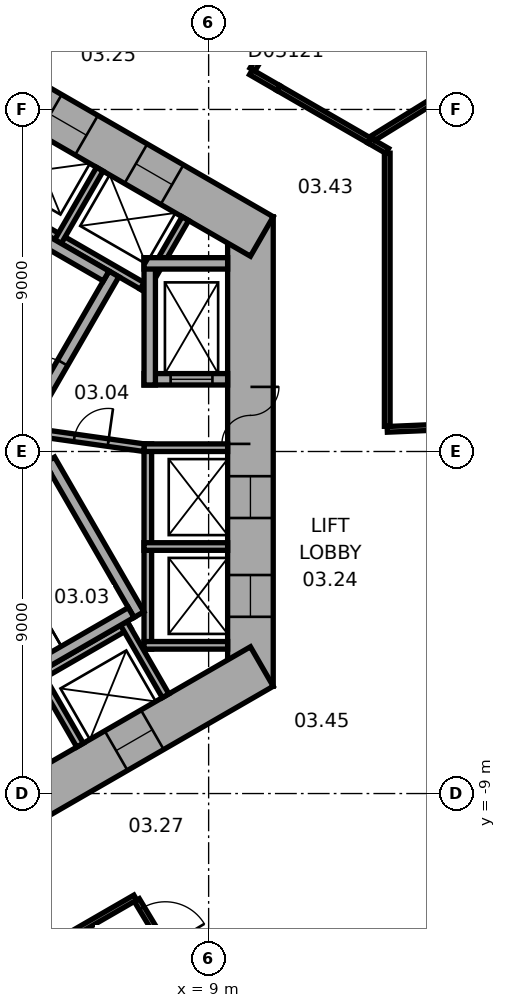
"""IFC4 building model, lengths in metres.
Left out: names, types, materials, properties, quantities, classifications, styles, units other than length and angle.
Written with IfcOpenShell. Run it as: python <this file> out.ifc"""

import sys

from ifc_helpers import new_model, si_unit, direction, frame, frame_2d, origin, place, context, subcontext, project, spatial, rectangle, extrude, element, fill, save


model = new_model("IFC4")
c1 = context("Model", 3, precision=1e-05, world=origin(), true_north=direction((0.0, 1.0)))
c2 = subcontext(c1, "Body", "Model", "MODEL_VIEW")
j1 = project(units=[si_unit("LENGTHUNIT", "METRE"), si_unit("PLANEANGLEUNIT", "RADIAN")], contexts=[c1])
p1 = place(None, origin())
s1 = spatial("IfcSite", under=j1, at=p1, CompositionType="ELEMENT")
p2 = place(p1, origin())
s2 = spatial("IfcBuilding", under=s1, at=p2, CompositionType="ELEMENT")
p3 = place(p2, frame((0.0, 0.0, 21.0)))
s3 = spatial("IfcBuildingStorey", under=s2, at=p3, CompositionType="ELEMENT", Elevation=21.0)
p4 = place(p3, frame((10.1, -6.177, 0.0), z_axis=(0.0, 0.0, 1.0), x_axis=(0.0, 1.0, 0.0)))
e1 = element("IfcWall", 1, at=p4, inside=s3, PredefinedType="SHEAR", context=c2, shape_type="SweptSolid", body=[
    extrude(rectangle(XDim=12.355, YDim=1.2, at=frame_2d((6.177, 0.0))), origin(), (0.0, 0.0, 1.0), 8.0),
])
p5 = place(p4, frame((6.378, 0.0, 0.0)))
e2 = element("IfcOpeningElement", 2, at=p5, cuts=e1, PredefinedType="OPENING", context=c2, shape_type="SweptSolid", body=[
    extrude(rectangle(XDim=1.5, YDim=2.1, at=frame_2d((0.75, 1.05))), frame((0.0, 0.61, 0.0), z_axis=(0.0, -1.0, 0.0), x_axis=(1.0, 0.0, 0.0)), (0.0, 0.0, 1.0), 1.22),
])
p6 = place(p4, frame((1.828, 0.0, 0.0)))
e3 = element("IfcOpeningElement", 3, at=p6, cuts=e1, PredefinedType="OPENING", context=c2, shape_type="SweptSolid", body=[
    extrude(rectangle(XDim=1.1, YDim=2.1, at=frame_2d((0.55, 1.05))), frame((0.0, 0.61, 0.0), z_axis=(0.0, -1.0, 0.0), x_axis=(1.0, 0.0, 0.0)), (0.0, 0.0, 1.0), 1.22),
])
p7 = place(p4, frame((4.427, 0.0, 0.0)))
e4 = element("IfcOpeningElement", 4, at=p7, cuts=e1, PredefinedType="OPENING", context=c2, shape_type="SweptSolid", body=[
    extrude(rectangle(XDim=1.1, YDim=2.1, at=frame_2d((0.55, 1.05))), frame((0.0, 0.61, 0.0), z_axis=(0.0, -1.0, 0.0), x_axis=(1.0, 0.0, 0.0)), (0.0, 0.0, 1.0), 1.22),
])
p8 = place(p3, frame((10.4, 5.658, 0.0), z_axis=(0.0, 0.0, 1.0), x_axis=(-0.866021384402, 0.500006961711, 0.0)))
e5 = element("IfcWall", 5, at=p8, inside=s3, PredefinedType="SHEAR", context=c2, shape_type="SweptSolid", body=[
    extrude(rectangle(XDim=12.355, YDim=1.2, at=frame_2d((6.178, 0.0))), origin(), (0.0, 0.0, 1.0), 8.0),
])
p9 = place(p8, frame((2.728, 0.0, 0.0)))
e6 = element("IfcOpeningElement", 6, at=p9, cuts=e5, PredefinedType="OPENING", context=c2, shape_type="SweptSolid", body=[
    extrude(rectangle(XDim=1.1, YDim=2.1, at=frame_2d((0.55, 1.05))), frame((0.0, 0.61, 0.0), z_axis=(0.0, -1.0, 0.0), x_axis=(1.0, 0.0, 0.0)), (0.0, 0.0, 1.0), 1.22),
])
p10 = place(p8, frame((5.328, 0.0, 0.0)))
e7 = element("IfcOpeningElement", 7, at=p10, cuts=e5, PredefinedType="OPENING", context=c2, shape_type="SweptSolid", body=[
    extrude(rectangle(XDim=1.1, YDim=2.1, at=frame_2d((0.55, 1.05))), frame((0.0, 0.61, 0.0), z_axis=(0.0, -1.0, 0.0), x_axis=(1.0, 0.0, 0.0)), (0.0, 0.0, 1.0), 1.22),
])
p11 = place(p8, frame((7.928, 0.0, 0.0)))
e8 = element("IfcOpeningElement", 8, at=p11, cuts=e5, PredefinedType="OPENING", context=c2, shape_type="SweptSolid", body=[
    extrude(rectangle(XDim=1.1, YDim=2.1, at=frame_2d((0.55, 1.05))), frame((0.0, 0.61, 0.0), z_axis=(0.0, -1.0, 0.0), x_axis=(1.0, 0.0, 0.0)), (0.0, 0.0, 1.0), 1.22),
])
p12 = place(p3, frame((-0.3, -11.836, 0.0), z_axis=(0.0, 0.0, 1.0), x_axis=(0.866021384402, 0.500006961711, 0.0)))
e9 = element("IfcWall", 9, at=p12, inside=s3, PredefinedType="SHEAR", context=c2, shape_type="SweptSolid", body=[
    extrude(rectangle(XDim=12.355, YDim=1.2, at=frame_2d((6.178, 0.0))), origin(), (0.0, 0.0, 1.0), 8.0),
])
p13 = place(p12, frame((4.128, 0.0, 0.0)))
e10 = element("IfcOpeningElement", 10, at=p13, cuts=e9, PredefinedType="OPENING", context=c2, shape_type="SweptSolid", body=[
    extrude(rectangle(XDim=0.9, YDim=2.1, at=frame_2d((0.45, 1.05))), frame((0.0, 0.61, 0.0), z_axis=(0.0, -1.0, 0.0), x_axis=(1.0, 0.0, 0.0)), (0.0, 0.0, 1.0), 1.22),
])
p14 = place(p12, frame((7.928, 0.0, 0.0)))
e11 = element("IfcOpeningElement", 11, at=p14, cuts=e9, PredefinedType="OPENING", context=c2, shape_type="SweptSolid", body=[
    extrude(rectangle(XDim=1.1, YDim=2.1, at=frame_2d((0.55, 1.05))), frame((0.0, 0.61, 0.0), z_axis=(0.0, -1.0, 0.0), x_axis=(1.0, 0.0, 0.0)), (0.0, 0.0, 1.0), 1.22),
])
p15 = place(p3, frame((7.4, -5.2, 0.0), z_axis=(0.0, 0.0, 1.0), x_axis=(0.0, 1.0, 0.0)))
e12 = element("IfcWall", 12, at=p15, inside=s3, PredefinedType="PARTITIONING", context=c2, shape_type="SweptSolid", body=[
    extrude(rectangle(XDim=5.4, YDim=0.2, at=frame_2d((2.7, 0.0))), origin(), (0.0, 0.0, 1.0), 7.7),
])
for number, where, z_axis, x_axis in (
    (13, (7.3, -5.1, 0.0), (0.0, 0.0, 1.0), (1.0, 0.0, 0.0)),
    (14, (7.3, -2.5, 0.0), (0.0, 0.0, 1.0), (1.0, 0.0, 0.0)),
    (15, (7.3, 0.1, 0.0), (0.0, 0.0, 1.0), (1.0, 0.0, 0.0)),
):
    element("IfcWall", number, at=place(p3, frame(where, z_axis=z_axis, x_axis=x_axis)), inside=s3, PredefinedType="PARTITIONING", context=c2, shape_type="SweptSolid", body=[
        extrude(rectangle(XDim=2.2, YDim=0.2, at=frame_2d((1.1, 0.0))), origin(), (0.0, 0.0, 1.0), 7.7),
    ])
p16 = place(p3, frame((7.424, 4.259, 0.0), z_axis=(0.0, 0.0, 1.0), x_axis=(-0.866026010844, 0.49999894854, 0.0)))
e16 = element("IfcWall", 16, at=p16, inside=s3, PredefinedType="PARTITIONING", context=c2, shape_type="SweptSolid", body=[
    extrude(rectangle(XDim=8.0, YDim=0.2, at=frame_2d((4.0, 0.0))), origin(), (0.0, 0.0, 1.0), 7.7),
])
for number, where, z_axis, x_axis in (
    (17, (7.287, 4.222, 0.0), (0.0, 0.0, 1.0), (0.5, 0.866, 0.0)),
    (18, (5.036, 5.522, 0.0), (0.0, 0.0, 1.0), (0.5, 0.866, 0.0)),
):
    element("IfcWall", number, at=place(p3, frame(where, z_axis=z_axis, x_axis=x_axis)), inside=s3, PredefinedType="PARTITIONING", context=c2, shape_type="SweptSolid", body=[
        extrude(rectangle(XDim=2.2, YDim=0.2, at=frame_2d((1.1, 0.0))), origin(), (0.0, 0.0, 1.0), 7.7),
    ])
p17 = place(p3, frame((-0.024, -8.559, 0.0), z_axis=(0.0, 0.0, 1.0), x_axis=(0.866026010844, 0.49999894854, 0.0)))
e19 = element("IfcWall", 19, at=p17, inside=s3, PredefinedType="PARTITIONING", context=c2, shape_type="SweptSolid", body=[
    extrude(rectangle(XDim=8.0, YDim=0.2, at=frame_2d((4.0, 0.0))), origin(), (0.0, 0.0, 1.0), 7.7),
])
for number, where, z_axis, x_axis in (
    (20, (4.516, -5.822, 0.0), (0.0, 0.0, 1.0), (0.5, -0.866, 0.0)),
    (21, (6.768, -4.522, 0.0), (0.0, 0.0, 1.0), (0.5, -0.866, 0.0)),
):
    element("IfcWall", number, at=place(p3, frame(where, z_axis=z_axis, x_axis=x_axis)), inside=s3, PredefinedType="PARTITIONING", context=c2, shape_type="SweptSolid", body=[
        extrude(rectangle(XDim=2.2, YDim=0.2, at=frame_2d((1.1, 0.0))), origin(), (0.0, 0.0, 1.0), 7.7),
    ])
p18 = place(p3, frame((4.158, 0.602, 0.0), z_axis=(0.0, 0.0, 1.0), x_axis=(0.499977259774, 0.866038532462, 0.0)))
e22 = element("IfcWall", 22, at=p18, inside=s3, PredefinedType="SHEAR", context=c2, shape_type="SweptSolid", body=[
    extrude(rectangle(XDim=4.7, YDim=0.3, at=frame_2d((2.35, 0.0))), origin(), (0.0, 0.0, 1.0), 7.7),
])
p19 = place(p18, frame((0.8, 0.0, 0.0)))
e23 = element("IfcOpeningElement", 23, at=p19, cuts=e22, PredefinedType="OPENING", context=c2, shape_type="SweptSolid", body=[
    extrude(rectangle(XDim=1.2, YDim=2.1, at=frame_2d((0.6, 1.05))), frame((0.0, 0.16, 0.0), z_axis=(0.0, -1.0, 0.0), x_axis=(1.0, 0.0, 0.0)), (0.0, 0.0, 1.0), 0.32),
])
p20 = place(p3, frame((6.303, 4.617, 0.0), z_axis=(0.0, 0.0, 1.0), x_axis=(-0.866027801685, 0.499995846692, 0.0)))
e24 = element("IfcWall", 24, at=p20, inside=s3, PredefinedType="SHEAR", context=c2, shape_type="SweptSolid", body=[
    extrude(rectangle(XDim=7.06, YDim=0.3, at=frame_2d((3.53, 0.0))), origin(), (0.0, 0.0, 1.0), 7.7),
])
p21 = place(p3, frame((4.816, -0.222, 0.0), z_axis=(0.0, 0.0, 1.0), x_axis=(0.499977259774, -0.866038532462, 0.0)))
e25 = element("IfcWall", 25, at=p21, inside=s3, PredefinedType="SHEAR", context=c2, shape_type="SweptSolid", body=[
    extrude(rectangle(XDim=4.7, YDim=0.3, at=frame_2d((2.35, 0.0))), origin(), (0.0, 0.0, 1.0), 7.7),
])
p22 = place(p3, frame((0.847, -7.767, 0.0), z_axis=(0.0, 0.0, 1.0), x_axis=(0.866027801685, 0.499995846692, 0.0)))
e26 = element("IfcWall", 26, at=p22, inside=s3, PredefinedType="SHEAR", context=c2, shape_type="SweptSolid", body=[
    extrude(rectangle(XDim=7.06, YDim=0.3, at=frame_2d((3.53, 0.0))), origin(), (0.0, 0.0, 1.0), 7.7),
])
p23 = place(p3, frame((7.3, 1.9, 0.0), z_axis=(0.0, 0.0, 1.0), x_axis=(1.0, 0.0, 0.0)))
e27 = element("IfcWall", 27, at=p23, inside=s3, PredefinedType="SHEAR", context=c2, shape_type="SweptSolid", body=[
    extrude(rectangle(XDim=2.2, YDim=0.3, at=frame_2d((1.1, 0.0))), origin(), (0.0, 0.0, 1.0), 7.7),
])
p24 = place(p23, frame((0.7, 0.0, 0.0)))
e28 = element("IfcOpeningElement", 28, at=p24, cuts=e27, PredefinedType="OPENING", context=c2, shape_type="SweptSolid", body=[
    extrude(rectangle(XDim=1.1, YDim=2.1, at=frame_2d((0.55, 1.05))), frame((0.0, 0.16, 0.0), z_axis=(0.0, -1.0, 0.0), x_axis=(1.0, 0.0, 0.0)), (0.0, 0.0, 1.0), 0.32),
])
p25 = place(p3, frame((7.45, 1.75, 0.0), z_axis=(0.0, 0.0, 1.0), x_axis=(0.0, 1.0, 0.0)))
e29 = element("IfcWall", 29, at=p25, inside=s3, PredefinedType="SHEAR", context=c2, shape_type="SweptSolid", body=[
    extrude(rectangle(XDim=3.35, YDim=0.3, at=frame_2d((1.675, 0.0))), origin(), (0.0, 0.0, 1.0), 7.7),
])
p26 = place(p3, frame((7.3, 4.95, 0.0), z_axis=(0.0, 0.0, 1.0), x_axis=(1.0, 0.0, 0.0)))
e30 = element("IfcWall", 30, at=p26, inside=s3, PredefinedType="SHEAR", context=c2, shape_type="SweptSolid", body=[
    extrude(rectangle(XDim=2.2, YDim=0.3, at=frame_2d((1.1, 0.0))), origin(), (0.0, 0.0, 1.0), 7.7),
])
p27 = place(p3, frame((4.327, 0.521, 0.0), z_axis=(0.0, 0.0, 1.0), x_axis=(0.990124376366, -0.14019172346, 0.0)))
e31 = element("IfcWall", 31, at=p27, inside=s3, PredefinedType="PARTITIONING", context=c2, shape_type="SweptSolid", body=[
    extrude(rectangle(XDim=3.002, YDim=0.2, at=frame_2d((1.501, 0.0))), origin(), (0.0, 0.0, 1.0), 7.7),
])
p28 = place(p27, frame((1.15, 0.0, 0.0)))
e32 = element("IfcOpeningElement", 32, at=p28, cuts=e31, PredefinedType="OPENING", context=c2, shape_type="SweptSolid", body=[
    extrude(rectangle(XDim=0.9, YDim=2.1, at=frame_2d((0.45, 1.05))), frame((0.0, 0.11, 0.0), z_axis=(0.0, -1.0, 0.0), x_axis=(1.0, 0.0, 0.0)), (0.0, 0.0, 1.0), 0.22),
])
p29 = place(p3, frame((10.924, -18.133, 0.0), z_axis=(0.0, 0.0, 1.0), x_axis=(-0.516035715917, 0.856567066784, 0.0)))
e33 = element("IfcWall", 33, at=p29, inside=s3, PredefinedType="PARTITIONING", context=c2, shape_type="SweptSolid", body=[
    extrude(rectangle(XDim=7.387, YDim=0.15, at=frame_2d((3.693, 0.0))), origin(), (0.0, 0.0, 1.0), 7.7),
])
p30 = place(p29, frame((5.937, 0.0, 0.0)))
e34 = element("IfcOpeningElement", 34, at=p30, cuts=e33, PredefinedType="OPENING", context=c2, shape_type="SweptSolid", body=[
    extrude(rectangle(XDim=1.2, YDim=2.1, at=frame_2d((0.6, 1.05))), frame((0.0, 0.085, 0.0), z_axis=(0.0, -1.0, 0.0), x_axis=(1.0, 0.0, 0.0)), (0.0, 0.0, 1.0), 0.17),
])
p31 = place(p3, frame((0.475, -15.545, 0.0), z_axis=(0.0, 0.0, 1.0), x_axis=(0.866021168401, 0.500007335828, 0.0)))
e35 = element("IfcWall", 35, at=p31, inside=s3, PredefinedType="PARTITIONING", context=c2, shape_type="SweptSolid", body=[
    extrude(rectangle(XDim=7.616, YDim=0.15, at=frame_2d((3.808, 0.0))), origin(), (0.0, 0.0, 1.0), 7.7),
])
p32 = place(p3, frame((21.15, 0.899, 0.0), z_axis=(0.0, 0.0, 1.0), x_axis=(-0.999097940345, -0.04246534585, 0.0)))
e36 = element("IfcWall", 36, at=p32, inside=s3, PredefinedType="PARTITIONING", context=c2, shape_type="SweptSolid", body=[
    extrude(rectangle(XDim=7.457, YDim=0.15, at=frame_2d((3.729, 0.0))), origin(), (0.0, 0.0, 1.0), 7.7),
])
p33 = place(p3, frame((13.7, 7.85, 0.0), z_axis=(0.0, 0.0, 1.0), x_axis=(0.0, -1.0, 0.0)))
e37 = element("IfcWall", 37, at=p33, inside=s3, PredefinedType="PARTITIONING", context=c2, shape_type="SweptSolid", body=[
    extrude(rectangle(XDim=7.187, YDim=0.15, at=frame_2d((3.594, 0.0))), origin(), (0.0, 0.0, 1.0), 7.7),
])
p34 = place(p3, frame((13.7, 7.909, 0.0), z_axis=(0.0, 0.0, 1.0), x_axis=(-0.865629350875, 0.50068535719, 0.0)))
e38 = element("IfcWall", 38, at=p34, inside=s3, PredefinedType="PARTITIONING", context=c2, shape_type="SweptSolid", body=[
    extrude(rectangle(XDim=0.549, YDim=0.15, at=frame_2d((0.274, 0.0))), origin(), (0.0, 0.0, 1.0), 7.7),
])
p35 = place(p3, frame((10.833, 9.564, 0.0), z_axis=(0.0, 0.0, 1.0), x_axis=(0.866091368387, -0.499885728548, 0.0)))
e39 = element("IfcWall", 39, at=p35, inside=s3, PredefinedType="PARTITIONING", context=c2, shape_type="SweptSolid", body=[
    extrude(rectangle(XDim=2.761, YDim=0.15, at=frame_2d((1.381, 0.0))), origin(), (0.0, 0.0, 1.0), 7.7),
])
p36 = place(p3, frame((10.114, 9.98, 0.0), z_axis=(0.0, 0.0, 1.0), x_axis=(0.865848115047, -0.500306947453, 0.0)))
e40 = element("IfcWall", 40, at=p36, inside=s3, PredefinedType="PARTITIONING", context=c2, shape_type="SweptSolid", body=[
    extrude(rectangle(XDim=0.832, YDim=0.15, at=frame_2d((0.416, 0.0))), origin(), (0.0, 0.0, 1.0), 7.7),
])
p37 = place(p3, frame((19.949, 12.345, 0.0), z_axis=(0.0, 0.0, 1.0), x_axis=(-0.850341306025, -0.526231568102, 0.0)))
e41 = element("IfcWall", 41, at=p37, inside=s3, PredefinedType="MOVABLE", context=c2, shape_type="SweptSolid", body=[
    extrude(rectangle(XDim=7.787, YDim=0.15, at=frame_2d((3.894, 0.0))), origin(), (0.0, 0.0, 1.0), 7.7),
])
p38 = place(p3, frame((13.772, 16.224, 0.0), z_axis=(0.0, 0.0, 1.0), x_axis=(-0.505547889018, -0.862798546539, 0.0)))
e42 = element("IfcWall", 42, at=p38, inside=s3, PredefinedType="PARTITIONING", context=c2, shape_type="SweptSolid", body=[
    extrude(rectangle(XDim=7.156, YDim=0.15, at=frame_2d((3.578, 0.0))), origin(), (0.0, 0.0, 1.0), 7.7),
])
p39 = place(p38, frame((5.706, 0.0, 0.0)))
e43 = element("IfcOpeningElement", 43, at=p39, cuts=e42, PredefinedType="OPENING", context=c2, shape_type="SweptSolid", body=[
    extrude(rectangle(XDim=1.2, YDim=2.1, at=frame_2d((0.6, 1.05))), frame((0.0, 0.085, 0.0), z_axis=(0.0, -1.0, 0.0), x_axis=(1.0, 0.0, 0.0)), (0.0, 0.0, 1.0), 0.17),
])
p40 = place(p5, origin())
e44 = element("IfcDoor", 44, at=p40, inside=s3, OperationType="DOUBLE_DOOR_SINGLE_SWING", PredefinedType="DOOR", context=c2, shape_type="SweptSolid", body=[
    extrude(rectangle(XDim=1.5, YDim=2.1, at=frame_2d((0.75, 1.05))), frame((0.0, 0.025, 0.0), z_axis=(0.0, -1.0, 0.0), x_axis=(1.0, 0.0, 0.0)), (0.0, 0.0, 1.0), 0.05),
])
fill(e2, e44)
p41 = place(p19, origin())
e45 = element("IfcDoor", 45, at=p41, inside=s3, OperationType="SINGLE_SWING_RIGHT", PredefinedType="DOOR", context=c2, shape_type="SweptSolid", body=[
    extrude(rectangle(XDim=1.2, YDim=2.1, at=frame_2d((0.6, 1.05))), frame((0.0, 0.025, 0.0), z_axis=(0.0, -1.0, 0.0), x_axis=(1.0, 0.0, 0.0)), (0.0, 0.0, 1.0), 0.05),
])
fill(e23, e45)
p42 = place(p28, origin())
e46 = element("IfcDoor", 46, at=p42, inside=s3, OperationType="SINGLE_SWING_LEFT", PredefinedType="DOOR", context=c2, shape_type="SweptSolid", body=[
    extrude(rectangle(XDim=0.9, YDim=2.1, at=frame_2d((0.45, 1.05))), frame((0.0, 0.025, 0.0), z_axis=(0.0, -1.0, 0.0), x_axis=(1.0, 0.0, 0.0)), (0.0, 0.0, 1.0), 0.05),
])
fill(e32, e46)
p43 = place(p24, origin())
e47 = element("IfcDoor", 47, at=p43, inside=s3, OperationType="DOUBLE_DOOR_SLIDING", PredefinedType="DOOR", context=c2, shape_type="SweptSolid", body=[
    extrude(rectangle(XDim=1.1, YDim=2.1, at=frame_2d((0.55, 1.05))), frame((0.0, 0.025, 0.0), z_axis=(0.0, -1.0, 0.0), x_axis=(1.0, 0.0, 0.0)), (0.0, 0.0, 1.0), 0.05),
])
fill(e28, e47)
p44 = place(p6, origin())
e48 = element("IfcDoor", 48, at=p44, inside=s3, OperationType="DOUBLE_DOOR_SLIDING", PredefinedType="DOOR", context=c2, shape_type="SweptSolid", body=[
    extrude(rectangle(XDim=1.1, YDim=2.1, at=frame_2d((0.55, 1.05))), frame((0.0, 0.025, 0.0), z_axis=(0.0, -1.0, 0.0), x_axis=(1.0, 0.0, 0.0)), (0.0, 0.0, 1.0), 0.05),
])
fill(e3, e48)
p45 = place(p7, origin())
e49 = element("IfcDoor", 49, at=p45, inside=s3, OperationType="DOUBLE_DOOR_SLIDING", PredefinedType="DOOR", context=c2, shape_type="SweptSolid", body=[
    extrude(rectangle(XDim=1.1, YDim=2.1, at=frame_2d((0.55, 1.05))), frame((0.0, 0.025, 0.0), z_axis=(0.0, -1.0, 0.0), x_axis=(1.0, 0.0, 0.0)), (0.0, 0.0, 1.0), 0.05),
])
fill(e4, e49)
p46 = place(p9, origin())
e50 = element("IfcDoor", 50, at=p46, inside=s3, OperationType="DOUBLE_DOOR_SLIDING", PredefinedType="DOOR", context=c2, shape_type="SweptSolid", body=[
    extrude(rectangle(XDim=1.1, YDim=2.1, at=frame_2d((0.55, 1.05))), frame((0.0, 0.025, 0.0), z_axis=(0.0, -1.0, 0.0), x_axis=(1.0, 0.0, 0.0)), (0.0, 0.0, 1.0), 0.05),
])
fill(e6, e50)
p47 = place(p10, origin())
e51 = element("IfcDoor", 51, at=p47, inside=s3, OperationType="DOUBLE_DOOR_SLIDING", PredefinedType="DOOR", context=c2, shape_type="SweptSolid", body=[
    extrude(rectangle(XDim=1.1, YDim=2.1, at=frame_2d((0.55, 1.05))), frame((0.0, 0.025, 0.0), z_axis=(0.0, -1.0, 0.0), x_axis=(1.0, 0.0, 0.0)), (0.0, 0.0, 1.0), 0.05),
])
fill(e7, e51)
p48 = place(p14, origin())
e52 = element("IfcDoor", 52, at=p48, inside=s3, OperationType="DOUBLE_DOOR_SLIDING", PredefinedType="DOOR", context=c2, shape_type="SweptSolid", body=[
    extrude(rectangle(XDim=1.1, YDim=2.1, at=frame_2d((0.55, 1.05))), frame((0.0, 0.025, 0.0), z_axis=(0.0, -1.0, 0.0), x_axis=(1.0, 0.0, 0.0)), (0.0, 0.0, 1.0), 0.05),
])
fill(e11, e52)
p49 = place(p30, origin())
e53 = element("IfcDoor", 53, at=p49, inside=s3, OperationType="SINGLE_SWING_LEFT", PredefinedType="DOOR", context=c2, shape_type="SweptSolid", body=[
    extrude(rectangle(XDim=1.2, YDim=2.1, at=frame_2d((0.6, 1.05))), frame((0.0, 0.025, 0.0), z_axis=(0.0, -1.0, 0.0), x_axis=(1.0, 0.0, 0.0)), (0.0, 0.0, 1.0), 0.05),
])
fill(e34, e53)
p50 = place(p39, origin())
e54 = element("IfcDoor", 54, at=p50, inside=s3, OperationType="SINGLE_SWING_LEFT", PredefinedType="DOOR", context=c2, shape_type="SweptSolid", body=[
    extrude(rectangle(XDim=1.2, YDim=2.1, at=frame_2d((0.6, 1.05))), frame((0.0, 0.025, 0.0), z_axis=(0.0, -1.0, 0.0), x_axis=(1.0, 0.0, 0.0)), (0.0, 0.0, 1.0), 0.05),
])
fill(e43, e54)
save(model, sys.argv[1])
